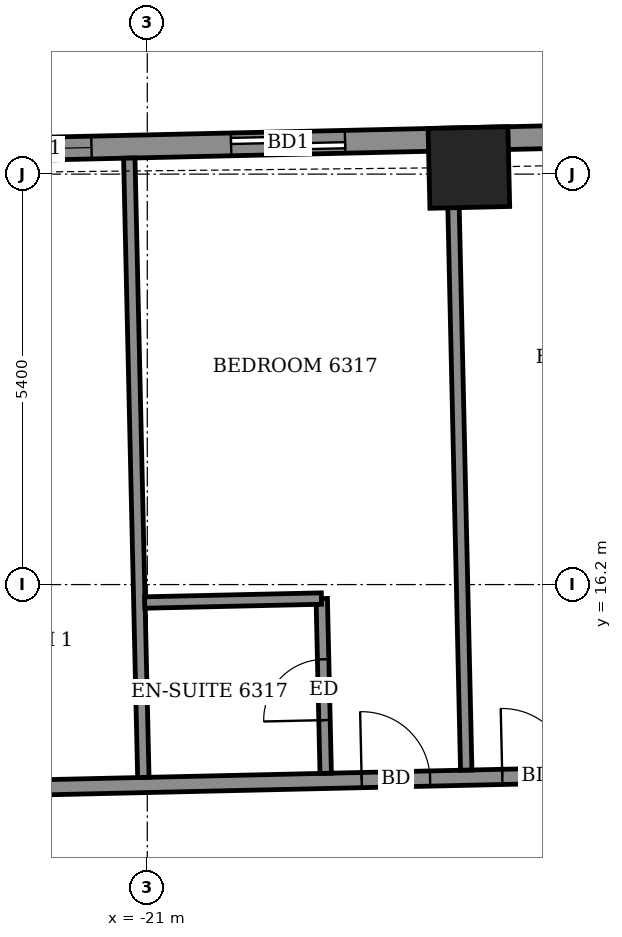
"""IFC4 building model, lengths in metres.
Left out: names, types, materials, properties, quantities, classifications, styles, units other than length and angle.
Written with IfcOpenShell. Run it as: python <this file> out.ifc"""

import sys

from ifc_helpers import new_model, si_unit, direction, frame, frame_2d, origin, origin_2d, place, context, subcontext, project, spatial, rectangle, extrude, element, fill, save


model = new_model("IFC4")
c1 = context("Model", 3, precision=1e-05, world=origin(), true_north=direction((0.0, 1.0)))
c2 = subcontext(c1, "Body", "Model", "MODEL_VIEW")
j1 = project(units=[si_unit("LENGTHUNIT", "METRE"), si_unit("PLANEANGLEUNIT", "RADIAN")], contexts=[c1])
p1 = place(None, origin())
s1 = spatial("IfcSite", under=j1, at=p1, CompositionType="ELEMENT")
p2 = place(p1, origin())
s2 = spatial("IfcBuilding", under=s1, at=p2, CompositionType="ELEMENT")
p3 = place(p2, frame((0.0, 0.0, 249.1)))
s3 = spatial("IfcBuildingStorey", under=s2, at=p3, CompositionType="ELEMENT", Elevation=249.1)
p4 = place(p3, frame((-16.769, 21.687, -0.55), z_axis=(0.0, 0.0, 1.0), x_axis=(-0.999742388325, -0.022697070002, 0.0)))
e1 = element("IfcColumn", 1, at=p4, inside=s3, PredefinedType="COLUMN", context=c2, shape_type="SweptSolid", body=[
    extrude(rectangle(XDim=1.05, YDim=1.05, at=origin_2d()), origin(), (0.0, 0.0, 1.0), 3.6),
])
p5 = place(p3, frame((20.403, 22.905, 0.0), z_axis=(0.0, 0.0, 1.0), x_axis=(-0.99974298964, -0.022670568288, 0.0)))
e2 = element("IfcWall", 2, at=p5, inside=s3, PredefinedType="SOLIDWALL", context=c2, shape_type="SweptSolid", body=[
    extrude(rectangle(XDim=44.509, YDim=0.3, at=frame_2d((22.254, 0.0))), origin(), (0.0, 0.0, 1.0), 2.5),
])
p6 = place(p5, frame((1.272, 0.0, 0.0)))
e3 = element("IfcOpeningElement", 3, at=p6, cuts=e2, PredefinedType="OPENING", context=c2, shape_type="SweptSolid", body=[
    extrude(rectangle(XDim=1.5, YDim=2.4, at=frame_2d((0.75, 1.2))), frame((0.0, 0.16, 0.0), z_axis=(0.0, -1.0, 0.0), x_axis=(1.0, 0.0, 0.0)), (0.0, 0.0, 1.0), 0.32),
])
p7 = place(p5, frame((4.501, 0.0, 0.0)))
e4 = element("IfcOpeningElement", 4, at=p7, cuts=e2, PredefinedType="OPENING", context=c2, shape_type="SweptSolid", body=[
    extrude(rectangle(XDim=1.5, YDim=2.4, at=frame_2d((0.75, 1.2))), frame((0.0, 0.16, 0.0), z_axis=(0.0, -1.0, 0.0), x_axis=(1.0, 0.0, 0.0)), (0.0, 0.0, 1.0), 0.32),
])
p8 = place(p5, frame((9.058, 0.0, 0.0)))
e5 = element("IfcOpeningElement", 5, at=p8, cuts=e2, PredefinedType="OPENING", context=c2, shape_type="SweptSolid", body=[
    extrude(rectangle(XDim=1.5, YDim=2.4, at=frame_2d((0.75, 1.2))), frame((0.0, 0.16, 0.0), z_axis=(0.0, -1.0, 0.0), x_axis=(1.0, 0.0, 0.0)), (0.0, 0.0, 1.0), 0.32),
])
p9 = place(p5, frame((12.46, 0.0, 0.0)))
e6 = element("IfcOpeningElement", 6, at=p9, cuts=e2, PredefinedType="OPENING", context=c2, shape_type="SweptSolid", body=[
    extrude(rectangle(XDim=1.5, YDim=2.4, at=frame_2d((0.75, 1.2))), frame((0.0, 0.16, 0.0), z_axis=(0.0, -1.0, 0.0), x_axis=(1.0, 0.0, 0.0)), (0.0, 0.0, 1.0), 0.32),
])
p10 = place(p5, frame((17.533, 0.0, 0.0)))
e7 = element("IfcOpeningElement", 7, at=p10, cuts=e2, PredefinedType="OPENING", context=c2, shape_type="SweptSolid", body=[
    extrude(rectangle(XDim=1.5, YDim=2.4, at=frame_2d((0.75, 1.2))), frame((0.0, 0.16, 0.0), z_axis=(0.0, -1.0, 0.0), x_axis=(1.0, 0.0, 0.0)), (0.0, 0.0, 1.0), 0.32),
])
p11 = place(p5, frame((22.993, 0.0, 0.0)))
e8 = element("IfcOpeningElement", 8, at=p11, cuts=e2, PredefinedType="OPENING", context=c2, shape_type="SweptSolid", body=[
    extrude(rectangle(XDim=1.2, YDim=2.4, at=frame_2d((0.6, 1.2))), frame((0.0, 0.16, 0.0), z_axis=(0.0, -1.0, 0.0), x_axis=(1.0, 0.0, 0.0)), (0.0, 0.0, 1.0), 0.32),
])
p12 = place(p5, frame((26.033, 0.0, 0.0)))
e9 = element("IfcOpeningElement", 9, at=p12, cuts=e2, PredefinedType="OPENING", context=c2, shape_type="SweptSolid", body=[
    extrude(rectangle(XDim=1.5, YDim=2.4, at=frame_2d((0.75, 1.2))), frame((0.0, 0.16, 0.0), z_axis=(0.0, -1.0, 0.0), x_axis=(1.0, 0.0, 0.0)), (0.0, 0.0, 1.0), 0.32),
])
p13 = place(p5, frame((30.827, 0.0, 0.0)))
e10 = element("IfcOpeningElement", 10, at=p13, cuts=e2, PredefinedType="OPENING", context=c2, shape_type="SweptSolid", body=[
    extrude(rectangle(XDim=1.5, YDim=2.4, at=frame_2d((0.75, 1.2))), frame((0.0, 0.16, 0.0), z_axis=(0.0, -1.0, 0.0), x_axis=(1.0, 0.0, 0.0)), (0.0, 0.0, 1.0), 0.32),
])
p14 = place(p5, frame((34.286, 0.0, 0.0)))
e11 = element("IfcOpeningElement", 11, at=p14, cuts=e2, PredefinedType="OPENING", context=c2, shape_type="SweptSolid", body=[
    extrude(rectangle(XDim=1.5, YDim=2.4, at=frame_2d((0.75, 1.2))), frame((0.0, 0.16, 0.0), z_axis=(0.0, -1.0, 0.0), x_axis=(1.0, 0.0, 0.0)), (0.0, 0.0, 1.0), 0.32),
])
p15 = place(p5, frame((38.811, 0.0, 0.0)))
e12 = element("IfcOpeningElement", 12, at=p15, cuts=e2, PredefinedType="OPENING", context=c2, shape_type="SweptSolid", body=[
    extrude(rectangle(XDim=1.5, YDim=2.4, at=frame_2d((0.75, 1.2))), frame((0.0, 0.16, 0.0), z_axis=(0.0, -1.0, 0.0), x_axis=(1.0, 0.0, 0.0)), (0.0, 0.0, 1.0), 0.32),
])
p16 = place(p5, frame((42.148, 0.0, 0.9)))
e13 = element("IfcOpeningElement", 13, at=p16, cuts=e2, PredefinedType="OPENING", context=c2, shape_type="SweptSolid", body=[
    extrude(rectangle(XDim=1.2, YDim=1.5, at=frame_2d((0.6, 0.75))), frame((0.0, 0.16, 0.0), z_axis=(0.0, -1.0, 0.0), x_axis=(1.0, 0.0, 0.0)), (0.0, 0.0, 1.0), 0.32),
])
p17 = place(p3, frame((-27.652, 13.413, 0.0), z_axis=(0.0, 0.0, 1.0), x_axis=(0.999742864992, 0.022676064408, 0.0)))
e14 = element("IfcWall", 14, at=p17, inside=s3, PredefinedType="PARTITIONING", context=c2, shape_type="SweptSolid", body=[
    extrude(rectangle(XDim=50.882, YDim=0.2, at=frame_2d((25.441, 0.0))), origin(), (0.0, 0.0, 1.0), 3.05),
])
p18 = place(p17, frame((47.801, 0.0, 0.0)))
e15 = element("IfcOpeningElement", 15, at=p18, cuts=e14, PredefinedType="OPENING", context=c2, shape_type="SweptSolid", body=[
    extrude(rectangle(XDim=1.0, YDim=2.1, at=frame_2d((0.5, 1.05))), frame((0.0, 0.11, 0.0), z_axis=(0.0, -1.0, 0.0), x_axis=(1.0, 0.0, 0.0)), (0.0, 0.0, 1.0), 0.22),
])
p19 = place(p17, frame((43.425, 0.0, 0.0)))
e16 = element("IfcOpeningElement", 16, at=p19, cuts=e14, PredefinedType="OPENING", context=c2, shape_type="SweptSolid", body=[
    extrude(rectangle(XDim=0.9, YDim=2.1, at=frame_2d((0.45, 1.05))), frame((0.0, 0.11, 0.0), z_axis=(0.0, -1.0, 0.0), x_axis=(1.0, 0.0, 0.0)), (0.0, 0.0, 1.0), 0.22),
])
p20 = place(p17, frame((36.8, 0.0, 0.0)))
e17 = element("IfcOpeningElement", 17, at=p20, cuts=e14, PredefinedType="OPENING", context=c2, shape_type="SweptSolid", body=[
    extrude(rectangle(XDim=0.9, YDim=2.1, at=frame_2d((0.45, 1.05))), frame((0.0, 0.11, 0.0), z_axis=(0.0, -1.0, 0.0), x_axis=(1.0, 0.0, 0.0)), (0.0, 0.0, 1.0), 0.22),
])
p21 = place(p17, frame((34.975, 0.0, 0.0)))
e18 = element("IfcOpeningElement", 18, at=p21, cuts=e14, PredefinedType="OPENING", context=c2, shape_type="SweptSolid", body=[
    extrude(rectangle(XDim=0.9, YDim=2.1, at=frame_2d((0.45, 1.05))), frame((0.0, 0.11, 0.0), z_axis=(0.0, -1.0, 0.0), x_axis=(1.0, 0.0, 0.0)), (0.0, 0.0, 1.0), 0.22),
])
p22 = place(p17, frame((28.325, 0.0, 0.0)))
e19 = element("IfcOpeningElement", 19, at=p22, cuts=e14, PredefinedType="OPENING", context=c2, shape_type="SweptSolid", body=[
    extrude(rectangle(XDim=0.9, YDim=2.1, at=frame_2d((0.45, 1.05))), frame((0.0, 0.11, 0.0), z_axis=(0.0, -1.0, 0.0), x_axis=(1.0, 0.0, 0.0)), (0.0, 0.0, 1.0), 0.22),
])
p23 = place(p17, frame((26.475, 0.0, 0.0)))
e20 = element("IfcOpeningElement", 20, at=p23, cuts=e14, PredefinedType="OPENING", context=c2, shape_type="SweptSolid", body=[
    extrude(rectangle(XDim=0.9, YDim=2.1, at=frame_2d((0.45, 1.05))), frame((0.0, 0.11, 0.0), z_axis=(0.0, -1.0, 0.0), x_axis=(1.0, 0.0, 0.0)), (0.0, 0.0, 1.0), 0.22),
])
p24 = place(p17, frame((19.825, 0.0, 0.0)))
e21 = element("IfcOpeningElement", 21, at=p24, cuts=e14, PredefinedType="OPENING", context=c2, shape_type="SweptSolid", body=[
    extrude(rectangle(XDim=0.9, YDim=2.1, at=frame_2d((0.45, 1.05))), frame((0.0, 0.11, 0.0), z_axis=(0.0, -1.0, 0.0), x_axis=(1.0, 0.0, 0.0)), (0.0, 0.0, 1.0), 0.22),
])
p25 = place(p17, frame((17.975, 0.0, 0.0)))
e22 = element("IfcOpeningElement", 22, at=p25, cuts=e14, PredefinedType="OPENING", context=c2, shape_type="SweptSolid", body=[
    extrude(rectangle(XDim=0.9, YDim=2.1, at=frame_2d((0.45, 1.05))), frame((0.0, 0.11, 0.0), z_axis=(0.0, -1.0, 0.0), x_axis=(1.0, 0.0, 0.0)), (0.0, 0.0, 1.0), 0.22),
])
p26 = place(p17, frame((11.325, 0.0, 0.0)))
e23 = element("IfcOpeningElement", 23, at=p26, cuts=e14, PredefinedType="OPENING", context=c2, shape_type="SweptSolid", body=[
    extrude(rectangle(XDim=0.9, YDim=2.1, at=frame_2d((0.45, 1.05))), frame((0.0, 0.11, 0.0), z_axis=(0.0, -1.0, 0.0), x_axis=(1.0, 0.0, 0.0)), (0.0, 0.0, 1.0), 0.22),
])
p27 = place(p17, frame((9.475, 0.0, 0.0)))
e24 = element("IfcOpeningElement", 24, at=p27, cuts=e14, PredefinedType="OPENING", context=c2, shape_type="SweptSolid", body=[
    extrude(rectangle(XDim=0.9, YDim=2.1, at=frame_2d((0.45, 1.05))), frame((0.0, 0.11, 0.0), z_axis=(0.0, -1.0, 0.0), x_axis=(1.0, 0.0, 0.0)), (0.0, 0.0, 1.0), 0.22),
])
p28 = place(p17, frame((2.772, 0.0, 0.0)))
e25 = element("IfcOpeningElement", 25, at=p28, cuts=e14, PredefinedType="OPENING", context=c2, shape_type="SweptSolid", body=[
    extrude(rectangle(XDim=1.0, YDim=2.1, at=frame_2d((0.5, 1.05))), frame((0.0, 0.11, 0.0), z_axis=(0.0, -1.0, 0.0), x_axis=(1.0, 0.0, 0.0)), (0.0, 0.0, 1.0), 0.22),
])
p29 = place(p3, frame((-21.052, 13.663, 0.0), z_axis=(0.0, 0.0, 1.0), x_axis=(-0.022706435224, 0.999742175663, 0.0)))
e26 = element("IfcWall", 26, at=p29, inside=s3, PredefinedType="PARTITIONING", context=c2, shape_type="SweptSolid", body=[
    extrude(rectangle(XDim=8.15, YDim=0.15, at=frame_2d((4.075, 0.0))), origin(), (0.0, 0.0, 1.0), 2.5),
])
p30 = place(p3, frame((-18.653, 13.717, 0.0), z_axis=(0.0, 0.0, 1.0), x_axis=(-0.022612884682, 0.999744296031, 0.0)))
e27 = element("IfcWall", 27, at=p30, inside=s3, PredefinedType="PARTITIONING", context=c2, shape_type="SweptSolid", body=[
    extrude(rectangle(XDim=2.3, YDim=0.15, at=frame_2d((1.15, 0.0))), origin(), (0.0, 0.0, 1.0), 3.05),
])
p31 = place(p30, frame((0.7, 0.0, 0.0)))
e28 = element("IfcOpeningElement", 28, at=p31, cuts=e27, PredefinedType="OPENING", context=c2, shape_type="SweptSolid", body=[
    extrude(rectangle(XDim=0.8, YDim=2.1, at=frame_2d((0.4, 1.05))), frame((0.0, 0.085, 0.0), z_axis=(0.0, -1.0, 0.0), x_axis=(1.0, 0.0, 0.0)), (0.0, 0.0, 1.0), 0.17),
])
p32 = place(p3, frame((-16.804, 13.759, 0.0), z_axis=(0.0, 0.0, 1.0), x_axis=(-0.022586673637, 0.999744888546, 0.0)))
e29 = element("IfcWall", 29, at=p32, inside=s3, PredefinedType="PARTITIONING", context=c2, shape_type="SweptSolid", body=[
    extrude(rectangle(XDim=8.15, YDim=0.15, at=frame_2d((4.075, 0.0))), origin(), (0.0, 0.0, 1.0), 3.05),
])
p33 = place(p3, frame((-21.034, 15.964, 0.0), z_axis=(0.0, 0.0, 1.0), x_axis=(0.999749954681, 0.022361308448, 0.0)))
e30 = element("IfcWall", 30, at=p33, inside=s3, PredefinedType="PARTITIONING", context=c2, shape_type="SweptSolid", body=[
    extrude(rectangle(XDim=2.325, YDim=0.15, at=frame_2d((1.163, 0.0))), origin(), (0.0, 0.0, 1.0), 3.05),
])
p34 = place(p15, origin())
e31 = element("IfcDoor", 31, at=p34, inside=s3, OperationType="SLIDING_TO_LEFT", PredefinedType="DOOR", context=c2, shape_type="SweptSolid", body=[
    extrude(rectangle(XDim=1.5, YDim=2.4, at=frame_2d((0.75, 1.2))), frame((0.0, 0.025, 0.0), z_axis=(0.0, -1.0, 0.0), x_axis=(1.0, 0.0, 0.0)), (0.0, 0.0, 1.0), 0.05),
])
fill(e12, e31)
p35 = place(p16, origin())
e32 = element("IfcWindow", 32, at=p35, inside=s3, PartitioningType="SINGLE_PANEL", PredefinedType="WINDOW", context=c2, shape_type="SweptSolid", body=[
    extrude(rectangle(XDim=1.2, YDim=1.5, at=frame_2d((0.6, 0.75))), frame((0.0, 0.03, 0.0), z_axis=(0.0, -1.0, 0.0), x_axis=(1.0, 0.0, 0.0)), (0.0, 0.0, 1.0), 0.06),
])
fill(e13, e32)
p36 = place(p26, origin())
e33 = element("IfcDoor", 33, at=p36, inside=s3, OperationType="SINGLE_SWING_RIGHT", PredefinedType="DOOR", context=c2, shape_type="SweptSolid", body=[
    extrude(rectangle(XDim=0.9, YDim=2.1, at=frame_2d((0.45, 1.05))), frame((0.0, 0.025, 0.0), z_axis=(0.0, -1.0, 0.0), x_axis=(1.0, 0.0, 0.0)), (0.0, 0.0, 1.0), 0.05),
])
fill(e23, e33)
p37 = place(p27, origin())
e34 = element("IfcDoor", 34, at=p37, inside=s3, OperationType="SINGLE_SWING_LEFT", PredefinedType="DOOR", context=c2, shape_type="SweptSolid", body=[
    extrude(rectangle(XDim=0.9, YDim=2.1, at=frame_2d((0.45, 1.05))), frame((0.0, 0.025, 0.0), z_axis=(0.0, -1.0, 0.0), x_axis=(1.0, 0.0, 0.0)), (0.0, 0.0, 1.0), 0.05),
])
fill(e24, e34)
p38 = place(p31, origin())
e35 = element("IfcDoor", 35, at=p38, inside=s3, OperationType="SINGLE_SWING_LEFT", PredefinedType="DOOR", context=c2, shape_type="SweptSolid", body=[
    extrude(rectangle(XDim=0.8, YDim=2.1, at=frame_2d((0.4, 1.05))), frame((0.0, 0.025, 0.0), z_axis=(0.0, -1.0, 0.0), x_axis=(1.0, 0.0, 0.0)), (0.0, 0.0, 1.0), 0.05),
])
fill(e28, e35)
save(model, sys.argv[1])
